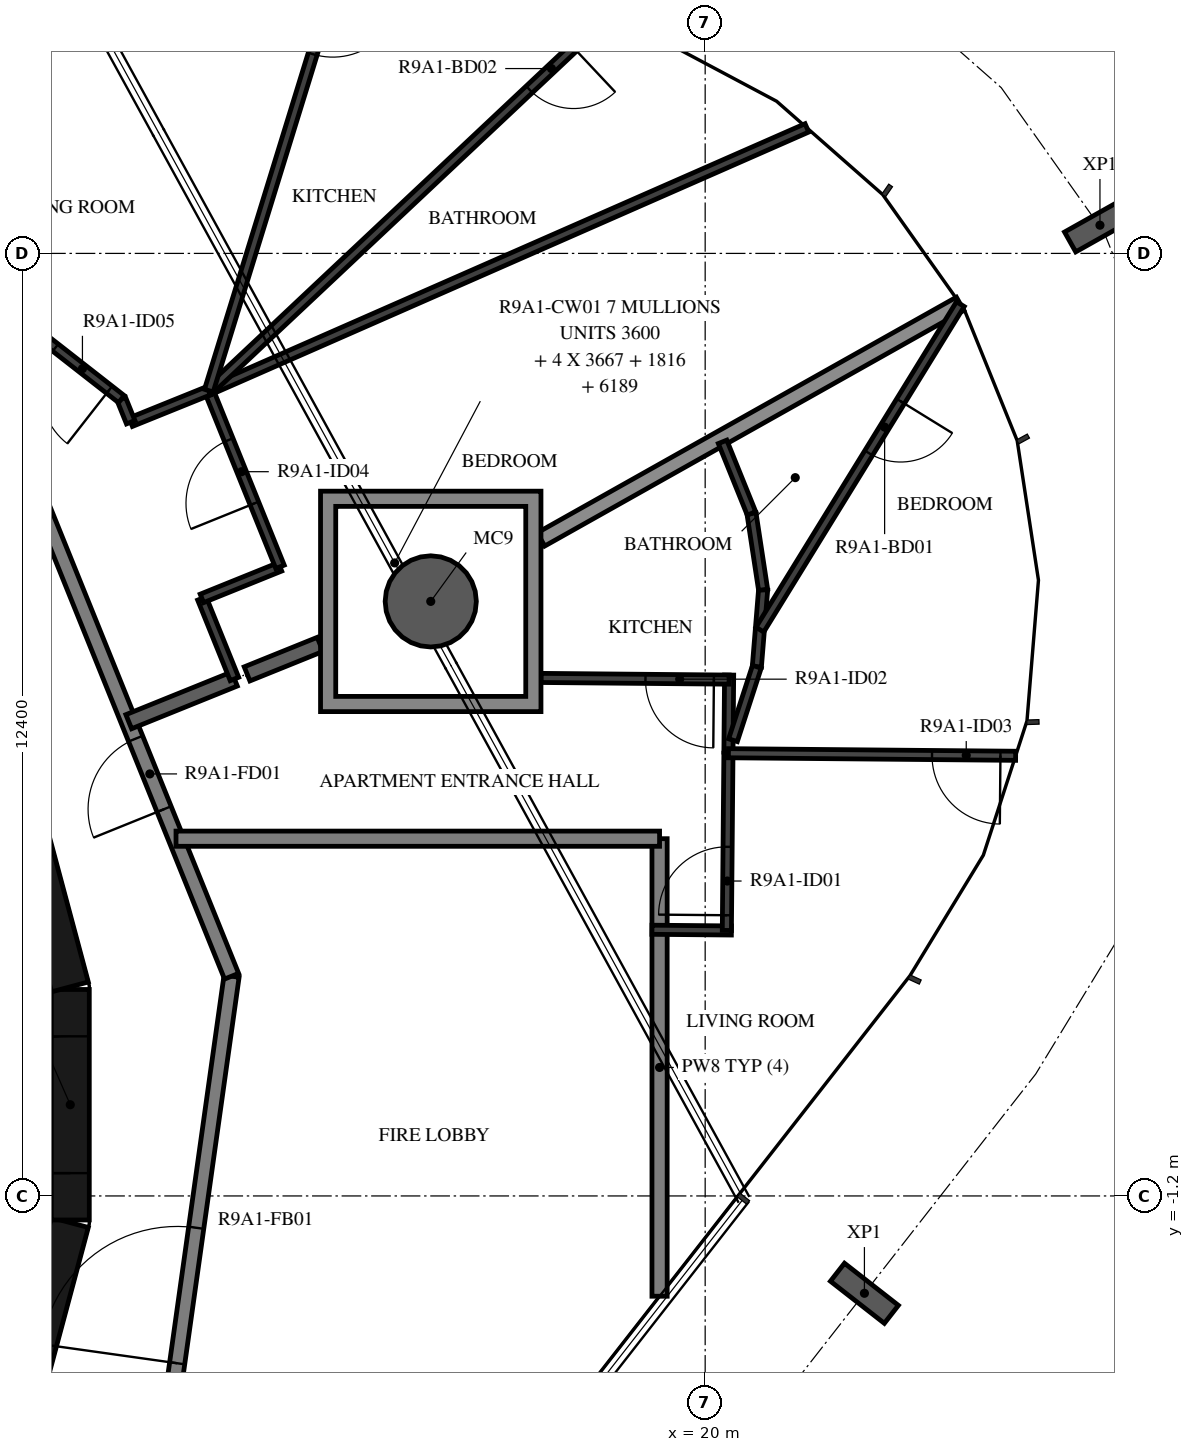
"""IFC4 building model, lengths in metres.
Left out: names, types, materials, properties, quantities, classifications, styles, units other than length and angle.
Written with IfcOpenShell. Run it as: python <this file> out.ifc"""

import sys

from ifc_helpers import new_model, si_unit, direction, frame, frame_2d, origin, origin_2d, place, context, subcontext, project, spatial, polyline, rectangle, hollow_circle, i_section, outline, extrude, element, fill, save


model = new_model("IFC4")
c1 = context("Model", 3, precision=1e-05, world=origin(), true_north=direction((0.0, 1.0)))
c2 = subcontext(c1, "Body", "Model", "MODEL_VIEW")
j1 = project(units=[si_unit("LENGTHUNIT", "METRE"), si_unit("PLANEANGLEUNIT", "RADIAN")], contexts=[c1])
p1 = place(None, origin())
s1 = spatial("IfcSite", under=j1, at=p1, CompositionType="ELEMENT")
p2 = place(p1, origin())
s2 = spatial("IfcBuilding", under=s1, at=p2, CompositionType="ELEMENT")
p3 = place(p2, frame((0.0, 0.0, 336.5)))
s3 = spatial("IfcBuildingStorey", under=s2, at=p3, CompositionType="ELEMENT", Elevation=336.5)
p4 = place(p3, frame((16.39, 6.622, -0.38), z_axis=(0.0, 0.0, 1.0), x_axis=(1.0, 0.0, 0.0)))
e1 = element("IfcColumn", 1, at=p4, inside=s3, PredefinedType="COLUMN", context=c2, shape_type="SweptSolid", body=[
    extrude(hollow_circle(Radius=0.6, WallThickness=0.03, at=origin_2d()), origin(), (0.0, 0.0, 1.0), 3.5),
])
for number, where, z_axis, x_axis in (
    (2, (22.095, -2.481, -0.38), (0.0, 0.0, 1.0), (-0.616, -0.788, 0.0)),
    (3, (25.194, 11.571, -0.38), (0.0, 0.0, 1.0), (0.49, -0.872, 0.0)),
):
    element("IfcColumn", number, at=place(p3, frame(where, z_axis=z_axis, x_axis=x_axis)), inside=s3, PredefinedType="COLUMN", context=c2, shape_type="SweptSolid", body=[
        extrude(i_section(OverallWidth=0.3, OverallDepth=0.9, WebThickness=0.019, FlangeThickness=0.035, FilletRadius=0.03, at=origin_2d()), origin(), (0.0, 0.0, 1.0), 3.5),
    ])
p5 = place(p3, frame((10.858, -4.479, 0.0), z_axis=(0.0, 0.0, 1.0), x_axis=(0.258734743916, 0.965948410781, 0.0)))
e4 = element("IfcWall", 4, at=p5, inside=s3, PredefinedType="SHEAR", context=c2, shape_type="SweptSolid", body=[
    extrude(rectangle(XDim=3.033, YDim=0.5, at=frame_2d((1.516, 0.0))), origin(), (0.0, 0.0, 1.0), 3.12),
])
p6 = place(p3, frame((11.647, -1.516, 0.0), z_axis=(0.0, 0.0, 1.0), x_axis=(0.0, 1.0, 0.0)))
e5 = element("IfcWall", 5, at=p6, inside=s3, PredefinedType="SHEAR", context=c2, shape_type="SweptSolid", body=[
    extrude(rectangle(XDim=3.033, YDim=0.5, at=frame_2d((1.516, 0.0))), origin(), (0.0, 0.0, 1.0), 3.12),
])
p7 = place(p6, frame((0.616, 0.0, 0.0)))
e6 = element("IfcOpeningElement", 6, at=p7, cuts=e5, PredefinedType="OPENING", context=c2, shape_type="SweptSolid", body=[
    extrude(rectangle(XDim=1.8, YDim=2.1, at=frame_2d((0.9, 1.05))), frame((0.0, 0.26, 0.0), z_axis=(0.0, -1.0, 0.0), x_axis=(1.0, 0.0, 0.0)), (0.0, 0.0, 1.0), 0.52),
])
p8 = place(p3, frame((11.643, 1.55, 0.0), z_axis=(0.0, 0.0, 1.0), x_axis=(-0.258734743916, 0.965948410781, 0.0)))
e7 = element("IfcWall", 7, at=p8, inside=s3, PredefinedType="SHEAR", context=c2, shape_type="SweptSolid", body=[
    extrude(rectangle(XDim=3.033, YDim=0.5, at=frame_2d((1.516, 0.0))), origin(), (0.0, 0.0, 1.0), 3.12),
])
p9 = place(p3, frame((12.77, -5.42, 0.0), z_axis=(0.0, 0.0, 1.0), x_axis=(0.139155334385, 0.990270565508, 0.0)))
e8 = element("IfcWall", 8, at=p9, inside=s3, PredefinedType="STANDARD", context=c2, shape_type="SweptSolid", body=[
    extrude(rectangle(XDim=7.181, YDim=0.2, at=frame_2d((3.59, 0.0))), origin(), (0.0, 0.0, 1.0), 3.12),
])
p10 = place(p9, frame((2.039, 0.0, 0.0)))
e9 = element("IfcOpeningElement", 9, at=p10, cuts=e8, PredefinedType="OPENING", context=c2, shape_type="SweptSolid", body=[
    extrude(rectangle(XDim=1.8, YDim=2.1, at=frame_2d((0.9, 1.05))), frame((0.0, 0.11, 0.0), z_axis=(0.0, -1.0, 0.0), x_axis=(1.0, 0.0, 0.0)), (0.0, 0.0, 1.0), 0.22),
])
p11 = place(p3, frame((13.769, 1.691, 0.0), z_axis=(0.0, 0.0, 1.0), x_axis=(-0.374618189599, 0.92717916932, 0.0)))
e10 = element("IfcWall", 10, at=p11, inside=s3, PredefinedType="STANDARD", context=c2, shape_type="SweptSolid", body=[
    extrude(rectangle(XDim=7.181, YDim=0.2, at=frame_2d((3.591, 0.0))), origin(), (0.0, 0.0, 1.0), 3.12),
])
p12 = place(p11, frame((2.371, 0.0, 0.0)))
e11 = element("IfcOpeningElement", 11, at=p12, cuts=e10, PredefinedType="OPENING", context=c2, shape_type="SweptSolid", body=[
    extrude(rectangle(XDim=1.0, YDim=2.1, at=frame_2d((0.5, 1.05))), frame((0.0, 0.11, 0.0), z_axis=(0.0, -1.0, 0.0), x_axis=(1.0, 0.0, 0.0)), (0.0, 0.0, 1.0), 0.22),
])
p13 = place(p3, frame((19.4, -2.519, 0.0), z_axis=(0.0, 0.0, 1.0), x_axis=(0.0, 1.0, 0.0)))
e12 = element("IfcWall", 12, at=p13, inside=s3, PredefinedType="STANDARD", context=c2, shape_type="SweptSolid", body=[
    extrude(rectangle(XDim=6.019, YDim=0.2, at=frame_2d((3.01, 0.0))), origin(), (0.0, 0.0, 1.0), 3.12),
])
p14 = place(p3, frame((19.4, 3.5, 0.0), z_axis=(0.0, 0.0, 1.0), x_axis=(-1.0, 0.0, 0.0)))
e13 = element("IfcWall", 13, at=p14, inside=s3, PredefinedType="STANDARD", context=c2, shape_type="SweptSolid", body=[
    extrude(rectangle(XDim=6.362, YDim=0.2, at=frame_2d((3.181, 0.0))), origin(), (0.0, 0.0, 1.0), 3.12),
])
p15 = place(p3, frame((13.807, 5.601, 0.0), z_axis=(0.0, 0.0, 1.0), x_axis=(-0.927202702405, -0.374559939999, 0.0)))
e14 = element("IfcWall", 14, at=p15, inside=s3, PredefinedType="STANDARD", context=c2, shape_type="SweptSolid", body=[
    extrude(rectangle(XDim=1.5, YDim=0.2, at=frame_2d((0.75, 0.0))), origin(), (0.0, 0.0, 1.0), 3.12),
])
p16 = place(p3, frame((14.934, 6.056, 0.0), z_axis=(0.0, 0.0, 1.0), x_axis=(-0.927219802432, -0.374517607032, 0.0)))
e15 = element("IfcWall", 15, at=p16, inside=s3, PredefinedType="STANDARD", context=c2, shape_type="SweptSolid", body=[
    extrude(rectangle(XDim=1.036, YDim=0.2, at=frame_2d((0.518, 0.0))), origin(), (0.0, 0.0, 1.0), 3.12),
])
p17 = place(p3, frame((23.354, 10.537, 0.0), z_axis=(0.0, 0.0, 1.0), x_axis=(-0.871719790551, -0.490004700754, 0.0)))
e16 = element("IfcWall", 16, at=p17, inside=s3, PredefinedType="STANDARD", context=c2, shape_type="SweptSolid", body=[
    extrude(rectangle(XDim=6.326, YDim=0.2, at=frame_2d((3.163, 0.0))), origin(), (0.0, 0.0, 1.0), 2.73),
])
p18 = place(p3, frame((19.3, 2.302, 0.0), z_axis=(0.0, 0.0, 1.0), x_axis=(0.999958506341, -0.009109643015, 0.0)))
e17 = element("IfcWall", 17, at=p18, inside=s3, PredefinedType="PARTITIONING", context=c2, shape_type="SweptSolid", body=[
    extrude(rectangle(XDim=1.045, YDim=0.12, at=frame_2d((0.522, 0.0))), origin(), (0.0, 0.0, 1.0), 3.12),
])
p19 = place(p3, frame((20.285, 2.293, 0.0), z_axis=(0.0, 0.0, 1.0), x_axis=(0.008900171034, 0.999960392693, 0.0)))
e18 = element("IfcWall", 18, at=p19, inside=s3, PredefinedType="PARTITIONING", context=c2, shape_type="SweptSolid", body=[
    extrude(rectangle(XDim=2.332, YDim=0.12, at=frame_2d((1.166, 0.0))), origin(), (0.0, 0.0, 1.0), 3.12),
])
p20 = place(p19, frame((0.2, 0.0, 0.0)))
e19 = element("IfcOpeningElement", 19, at=p20, cuts=e18, PredefinedType="OPENING", context=c2, shape_type="SweptSolid", body=[
    extrude(rectangle(XDim=0.9, YDim=2.1, at=frame_2d((0.45, 1.05))), frame((0.0, 0.07, 0.0), z_axis=(0.0, -1.0, 0.0), x_axis=(1.0, 0.0, 0.0)), (0.0, 0.0, 1.0), 0.14),
])
p21 = place(p3, frame((20.306, 4.639, 0.0), z_axis=(0.0, 0.0, 1.0), x_axis=(0.008906724211, 0.999960334345, 0.0)))
e20 = element("IfcWall", 20, at=p21, inside=s3, PredefinedType="PARTITIONING", context=c2, shape_type="SweptSolid", body=[
    extrude(rectangle(XDim=1.014, YDim=0.12, at=frame_2d((0.507, 0.0))), origin(), (0.0, 0.0, 1.0), 3.12),
])
p22 = place(p3, frame((20.315, 5.593, 0.0), z_axis=(0.0, 0.0, 1.0), x_axis=(-0.999960597409, 0.008877140833, 0.0)))
e21 = element("IfcWall", 21, at=p22, inside=s3, PredefinedType="PARTITIONING", context=c2, shape_type="SweptSolid", body=[
    extrude(rectangle(XDim=2.475, YDim=0.12, at=frame_2d((1.238, 0.0))), origin(), (0.0, 0.0, 1.0), 3.12),
])
p23 = place(p22, frame((0.2, 0.0, 0.0)))
e22 = element("IfcOpeningElement", 22, at=p23, cuts=e21, PredefinedType="OPENING", context=c2, shape_type="SweptSolid", body=[
    extrude(rectangle(XDim=0.9, YDim=2.1, at=frame_2d((0.45, 1.05))), frame((0.0, 0.07, 0.0), z_axis=(0.0, -1.0, 0.0), x_axis=(1.0, 0.0, 0.0)), (0.0, 0.0, 1.0), 0.14),
])
p24 = place(p3, frame((24.085, 4.591, 0.0), z_axis=(0.0, 0.0, 1.0), x_axis=(-0.99996025077, 0.008916102255, 0.0)))
e23 = element("IfcWall", 23, at=p24, inside=s3, PredefinedType="PARTITIONING", context=c2, shape_type="SweptSolid", body=[
    extrude(rectangle(XDim=3.779, YDim=0.12, at=frame_2d((1.889, 0.0))), origin(), (0.0, 0.0, 1.0), 2.73),
])
p25 = place(p24, frame((0.2, 0.0, 0.0)))
e24 = element("IfcOpeningElement", 24, at=p25, cuts=e23, PredefinedType="OPENING", context=c2, shape_type="SweptSolid", body=[
    extrude(rectangle(XDim=0.9, YDim=2.1, at=frame_2d((0.45, 1.05))), frame((0.0, 0.07, 0.0), z_axis=(0.0, -1.0, 0.0), x_axis=(1.0, 0.0, 0.0)), (0.0, 0.0, 1.0), 0.14),
])
p26 = place(p3, frame((20.762, 6.775, 0.0), z_axis=(0.0, 0.0, 1.0), x_axis=(-0.08121587, -0.996696534789, 0.0)))
e25 = element("IfcWall", 25, at=p26, inside=s3, PredefinedType="PARTITIONING", context=c2, shape_type="SweptSolid", body=[
    extrude(rectangle(XDim=1.016, YDim=0.12, at=frame_2d((0.508, 0.0))), origin(), (0.0, 0.0, 1.0), 3.12),
])
p27 = place(p3, frame((20.68, 5.762, 0.0), z_axis=(0.0, 0.0, 1.0), x_axis=(-0.30908063779, -0.951035834942, 0.0)))
e26 = element("IfcWall", 26, at=p27, inside=s3, PredefinedType="PARTITIONING", context=c2, shape_type="SweptSolid", body=[
    extrude(rectangle(XDim=1.016, YDim=0.12, at=frame_2d((0.508, 0.0))), origin(), (0.0, 0.0, 1.0), 3.12),
])
p28 = place(p3, frame((23.357, 10.532, 0.0), z_axis=(0.0, 0.0, 1.0), x_axis=(-0.524476563806, -0.851424884542, 0.0)))
e27 = element("IfcWall", 27, at=p28, inside=s3, PredefinedType="PARTITIONING", context=c2, shape_type="SweptSolid", body=[
    extrude(rectangle(XDim=5.029, YDim=0.12, at=frame_2d((2.515, 0.0))), origin(), (0.0, 0.0, 1.0), 3.12),
])
p29 = place(p28, frame((1.5, 0.0, 0.0)))
e28 = element("IfcOpeningElement", 28, at=p29, cuts=e27, PredefinedType="OPENING", context=c2, shape_type="SweptSolid", body=[
    extrude(rectangle(XDim=0.8, YDim=2.1, at=frame_2d((0.4, 1.05))), frame((0.0, 0.07, 0.0), z_axis=(0.0, -1.0, 0.0), x_axis=(1.0, 0.0, 0.0)), (0.0, 0.0, 1.0), 0.14),
])
p30 = place(p3, frame((20.762, 6.775, 0.0), z_axis=(0.0, 0.0, 1.0), x_axis=(-0.150702440861, 0.988579169474, 0.0)))
e29 = element("IfcWall", 29, at=p30, inside=s3, PredefinedType="PARTITIONING", context=c2, shape_type="SweptSolid", body=[
    extrude(rectangle(XDim=1.016, YDim=0.12, at=frame_2d((0.508, 0.0))), origin(), (0.0, 0.0, 1.0), 3.12),
])
p31 = place(p3, frame((20.609, 7.779, 0.0), z_axis=(0.0, 0.0, 1.0), x_axis=(-0.374371668856, 0.927278735633, 0.0)))
e30 = element("IfcWall", 30, at=p31, inside=s3, PredefinedType="PARTITIONING", context=c2, shape_type="SweptSolid", body=[
    extrude(rectangle(XDim=1.016, YDim=0.12, at=frame_2d((0.508, 0.0))), origin(), (0.0, 0.0, 1.0), 3.12),
])
p32 = place(p3, frame((13.807, 5.601, 0.0), z_axis=(0.0, 0.0, 1.0), x_axis=(-0.374480699852, 0.927234708927, 0.0)))
e31 = element("IfcWall", 31, at=p32, inside=s3, PredefinedType="PARTITIONING", context=c2, shape_type="SweptSolid", body=[
    extrude(rectangle(XDim=1.144, YDim=0.12, at=frame_2d((0.572, 0.0))), origin(), (0.0, 0.0, 1.0), 3.12),
])
p33 = place(p3, frame((13.379, 6.661, 0.0), z_axis=(0.0, 0.0, 1.0), x_axis=(0.927225655522, 0.374503115797, 0.0)))
e32 = element("IfcWall", 32, at=p33, inside=s3, PredefinedType="PARTITIONING", context=c2, shape_type="SweptSolid", body=[
    extrude(rectangle(XDim=1.108, YDim=0.12, at=frame_2d((0.554, 0.0))), origin(), (0.0, 0.0, 1.0), 3.12),
])
p34 = place(p3, frame((14.406, 7.076, 0.0), z_axis=(0.0, 0.0, 1.0), x_axis=(-0.374503415005, 0.927225534673, 0.0)))
e33 = element("IfcWall", 33, at=p34, inside=s3, PredefinedType="PARTITIONING", context=c2, shape_type="SweptSolid", body=[
    extrude(rectangle(XDim=2.5, YDim=0.12, at=frame_2d((1.25, 0.0))), origin(), (0.0, 0.0, 1.0), 3.12),
])
p35 = place(p34, frame((0.9, 0.0, 0.0)))
e34 = element("IfcOpeningElement", 34, at=p35, cuts=e33, PredefinedType="OPENING", context=c2, shape_type="SweptSolid", body=[
    extrude(rectangle(XDim=0.9, YDim=2.1, at=frame_2d((0.45, 1.05))), frame((0.0, 0.07, 0.0), z_axis=(0.0, -1.0, 0.0), x_axis=(1.0, 0.0, 0.0)), (0.0, 0.0, 1.0), 0.14),
])
p36 = place(p3, frame((13.47, 9.395, 0.0), z_axis=(0.0, 0.0, 1.0), x_axis=(-0.927180061276, -0.374615982003, 0.0)))
e35 = element("IfcWall", 35, at=p36, inside=s3, PredefinedType="PARTITIONING", context=c2, shape_type="SweptSolid", body=[
    extrude(rectangle(XDim=1.109, YDim=0.12, at=frame_2d((0.554, 0.0))), origin(), (0.0, 0.0, 1.0), 3.12),
])
p37 = place(p3, frame((12.442, 8.979, 0.0), z_axis=(0.0, 0.0, 1.0), x_axis=(-0.374979656603, 0.927033039936, 0.0)))
e36 = element("IfcWall", 36, at=p37, inside=s3, PredefinedType="PARTITIONING", context=c2, shape_type="SweptSolid", body=[
    extrude(rectangle(XDim=0.328, YDim=0.12, at=frame_2d((0.164, 0.0))), origin(), (0.0, 0.0, 1.0), 3.12),
])
p38 = place(p3, frame((12.319, 9.283, 0.0), z_axis=(0.0, 0.0, 1.0), x_axis=(-0.788000268464, 0.61567489546, 0.0)))
e37 = element("IfcWall", 37, at=p38, inside=s3, PredefinedType="PARTITIONING", context=c2, shape_type="SweptSolid", body=[
    extrude(rectangle(XDim=7.985, YDim=0.12, at=frame_2d((3.992, 0.0))), origin(), (0.0, 0.0, 1.0), 3.12),
])
p39 = place(p38, frame((0.2, 0.0, 0.0)))
e38 = element("IfcOpeningElement", 38, at=p39, cuts=e37, PredefinedType="OPENING", context=c2, shape_type="SweptSolid", body=[
    extrude(rectangle(XDim=0.9, YDim=2.1, at=frame_2d((0.45, 1.05))), frame((0.0, 0.07, 0.0), z_axis=(0.0, -1.0, 0.0), x_axis=(1.0, 0.0, 0.0)), (0.0, 0.0, 1.0), 0.14),
])
p40 = place(p3, frame((21.338, 12.851, 0.0), z_axis=(0.0, 0.0, 1.0), x_axis=(-0.915538158579, -0.402231127818, 0.0)))
e39 = element("IfcWall", 39, at=p40, inside=s3, PredefinedType="PARTITIONING", context=c2, shape_type="SweptSolid", body=[
    extrude(rectangle(XDim=8.594, YDim=0.12, at=frame_2d((4.297, 0.0))), origin(), (0.0, 0.0, 1.0), 3.12),
])
p41 = place(p3, frame((18.633, 14.248, 0.0), z_axis=(0.0, 0.0, 1.0), x_axis=(-0.728595344908, -0.684944394369, 0.0)))
e40 = element("IfcWall", 40, at=p41, inside=s3, PredefinedType="PARTITIONING", context=c2, shape_type="SweptSolid", body=[
    extrude(rectangle(XDim=7.086, YDim=0.12, at=frame_2d((3.543, 0.0))), origin(), (0.0, 0.0, 1.0), 3.12),
])
p42 = place(p41, frame((0.5, 0.0, 0.0)))
e41 = element("IfcOpeningElement", 41, at=p42, cuts=e40, PredefinedType="OPENING", context=c2, shape_type="SweptSolid", body=[
    extrude(rectangle(XDim=0.8, YDim=2.1, at=frame_2d((0.4, 1.05))), frame((0.0, 0.07, 0.0), z_axis=(0.0, -1.0, 0.0), x_axis=(1.0, 0.0, 0.0)), (0.0, 0.0, 1.0), 0.14),
])
p43 = place(p3, frame((15.16, 14.873, 0.0), z_axis=(0.0, 0.0, 1.0), x_axis=(-0.294750051258, -0.955574386055, 0.0)))
e42 = element("IfcWall", 42, at=p43, inside=s3, PredefinedType="PARTITIONING", context=c2, shape_type="SweptSolid", body=[
    extrude(rectangle(XDim=5.733, YDim=0.12, at=frame_2d((2.867, 0.0))), origin(), (0.0, 0.0, 1.0), 3.12),
])
p44 = place(p43, frame((0.2, 0.0, 0.0)))
e43 = element("IfcOpeningElement", 43, at=p44, cuts=e42, PredefinedType="OPENING", context=c2, shape_type="SweptSolid", body=[
    extrude(rectangle(XDim=0.9, YDim=2.1, at=frame_2d((0.45, 1.05))), frame((0.0, 0.07, 0.0), z_axis=(0.0, -1.0, 0.0), x_axis=(1.0, 0.0, 0.0)), (0.0, 0.0, 1.0), 0.14),
])
p45 = place(p3, origin())
e44 = element("IfcWall", 44, at=p45, inside=s3, PredefinedType="STANDARD", context=c2, shape_type="SweptSolid", body=[
    extrude(outline(polyline([(17.84, 8.072), (17.84, 5.172), (14.94, 5.172), (14.94, 8.072), (17.84, 8.072)]), holes=[polyline([(15.14, 5.372), (17.64, 5.372), (17.64, 7.872), (15.14, 7.872), (15.14, 5.372)])]), origin(), (0.0, 0.0, 1.0), 3.12),
])
p46 = place(p7, origin())
e45 = element("IfcDoor", 45, at=p46, inside=s3, OperationType="DOUBLE_DOOR_SINGLE_SWING", PredefinedType="DOOR", context=c2, shape_type="SweptSolid", body=[
    extrude(rectangle(XDim=1.8, YDim=2.1, at=frame_2d((0.9, 1.05))), frame((0.0, 0.025, 0.0), z_axis=(0.0, -1.0, 0.0), x_axis=(1.0, 0.0, 0.0)), (0.0, 0.0, 1.0), 0.05),
])
fill(e6, e45)
p47 = place(p12, origin())
e46 = element("IfcDoor", 46, at=p47, inside=s3, OperationType="SINGLE_SWING_LEFT", PredefinedType="DOOR", context=c2, shape_type="SweptSolid", body=[
    extrude(rectangle(XDim=1.0, YDim=2.1, at=frame_2d((0.5, 1.05))), frame((0.0, 0.025, 0.0), z_axis=(0.0, -1.0, 0.0), x_axis=(1.0, 0.0, 0.0)), (0.0, 0.0, 1.0), 0.05),
])
fill(e11, e46)
p48 = place(p20, origin())
e47 = element("IfcDoor", 47, at=p48, inside=s3, OperationType="SINGLE_SWING_RIGHT", PredefinedType="DOOR", context=c2, shape_type="SweptSolid", body=[
    extrude(rectangle(XDim=0.9, YDim=2.1, at=frame_2d((0.45, 1.05))), frame((0.0, 0.025, 0.0), z_axis=(0.0, -1.0, 0.0), x_axis=(1.0, 0.0, 0.0)), (0.0, 0.0, 1.0), 0.05),
])
fill(e19, e47)
p49 = place(p23, origin())
e48 = element("IfcDoor", 48, at=p49, inside=s3, OperationType="SINGLE_SWING_RIGHT", PredefinedType="DOOR", context=c2, shape_type="SweptSolid", body=[
    extrude(rectangle(XDim=0.9, YDim=2.1, at=frame_2d((0.45, 1.05))), frame((0.0, 0.025, 0.0), z_axis=(0.0, -1.0, 0.0), x_axis=(1.0, 0.0, 0.0)), (0.0, 0.0, 1.0), 0.05),
])
fill(e22, e48)
p50 = place(p25, origin())
e49 = element("IfcDoor", 49, at=p50, inside=s3, OperationType="SINGLE_SWING_RIGHT", PredefinedType="DOOR", context=c2, shape_type="SweptSolid", body=[
    extrude(rectangle(XDim=0.9, YDim=2.1, at=frame_2d((0.45, 1.05))), frame((0.0, 0.025, 0.0), z_axis=(0.0, -1.0, 0.0), x_axis=(1.0, 0.0, 0.0)), (0.0, 0.0, 1.0), 0.05),
])
fill(e24, e49)
p51 = place(p29, origin())
e50 = element("IfcDoor", 50, at=p51, inside=s3, OperationType="SINGLE_SWING_RIGHT", PredefinedType="DOOR", context=c2, shape_type="SweptSolid", body=[
    extrude(rectangle(XDim=0.8, YDim=2.1, at=frame_2d((0.4, 1.05))), frame((0.0, 0.025, 0.0), z_axis=(0.0, -1.0, 0.0), x_axis=(1.0, 0.0, 0.0)), (0.0, 0.0, 1.0), 0.05),
])
fill(e28, e50)
p52 = place(p35, origin())
e51 = element("IfcDoor", 51, at=p52, inside=s3, OperationType="SINGLE_SWING_LEFT", PredefinedType="DOOR", context=c2, shape_type="SweptSolid", body=[
    extrude(rectangle(XDim=0.9, YDim=2.1, at=frame_2d((0.45, 1.05))), frame((0.0, 0.025, 0.0), z_axis=(0.0, -1.0, 0.0), x_axis=(1.0, 0.0, 0.0)), (0.0, 0.0, 1.0), 0.05),
])
fill(e34, e51)
p53 = place(p39, origin())
e52 = element("IfcDoor", 52, at=p53, inside=s3, OperationType="SINGLE_SWING_LEFT", PredefinedType="DOOR", context=c2, shape_type="SweptSolid", body=[
    extrude(rectangle(XDim=0.9, YDim=2.1, at=frame_2d((0.45, 1.05))), frame((0.0, 0.025, 0.0), z_axis=(0.0, -1.0, 0.0), x_axis=(1.0, 0.0, 0.0)), (0.0, 0.0, 1.0), 0.05),
])
fill(e38, e52)
p54 = place(p44, origin())
e53 = element("IfcDoor", 53, at=p54, inside=s3, OperationType="SINGLE_SWING_LEFT", PredefinedType="DOOR", context=c2, shape_type="SweptSolid", body=[
    extrude(rectangle(XDim=0.9, YDim=2.1, at=frame_2d((0.45, 1.05))), frame((0.0, 0.025, 0.0), z_axis=(0.0, -1.0, 0.0), x_axis=(1.0, 0.0, 0.0)), (0.0, 0.0, 1.0), 0.05),
])
fill(e43, e53)
p55 = place(p42, origin())
e54 = element("IfcDoor", 54, at=p55, inside=s3, OperationType="SINGLE_SWING_LEFT", PredefinedType="DOOR", context=c2, shape_type="SweptSolid", body=[
    extrude(rectangle(XDim=0.8, YDim=2.1, at=frame_2d((0.4, 1.05))), frame((0.0, 0.025, 0.0), z_axis=(0.0, -1.0, 0.0), x_axis=(1.0, 0.0, 0.0)), (0.0, 0.0, 1.0), 0.05),
])
fill(e41, e54)
p56 = place(p10, origin())
e55 = element("IfcDoor", 55, at=p56, inside=s3, OperationType="DOUBLE_DOOR_SINGLE_SWING", PredefinedType="DOOR", context=c2, shape_type="SweptSolid", body=[
    extrude(rectangle(XDim=1.8, YDim=2.1, at=frame_2d((0.9, 1.05))), frame((0.0, 0.025, 0.0), z_axis=(0.0, -1.0, 0.0), x_axis=(1.0, 0.0, 0.0)), (0.0, 0.0, 1.0), 0.05),
])
fill(e9, e55)
save(model, sys.argv[1])
